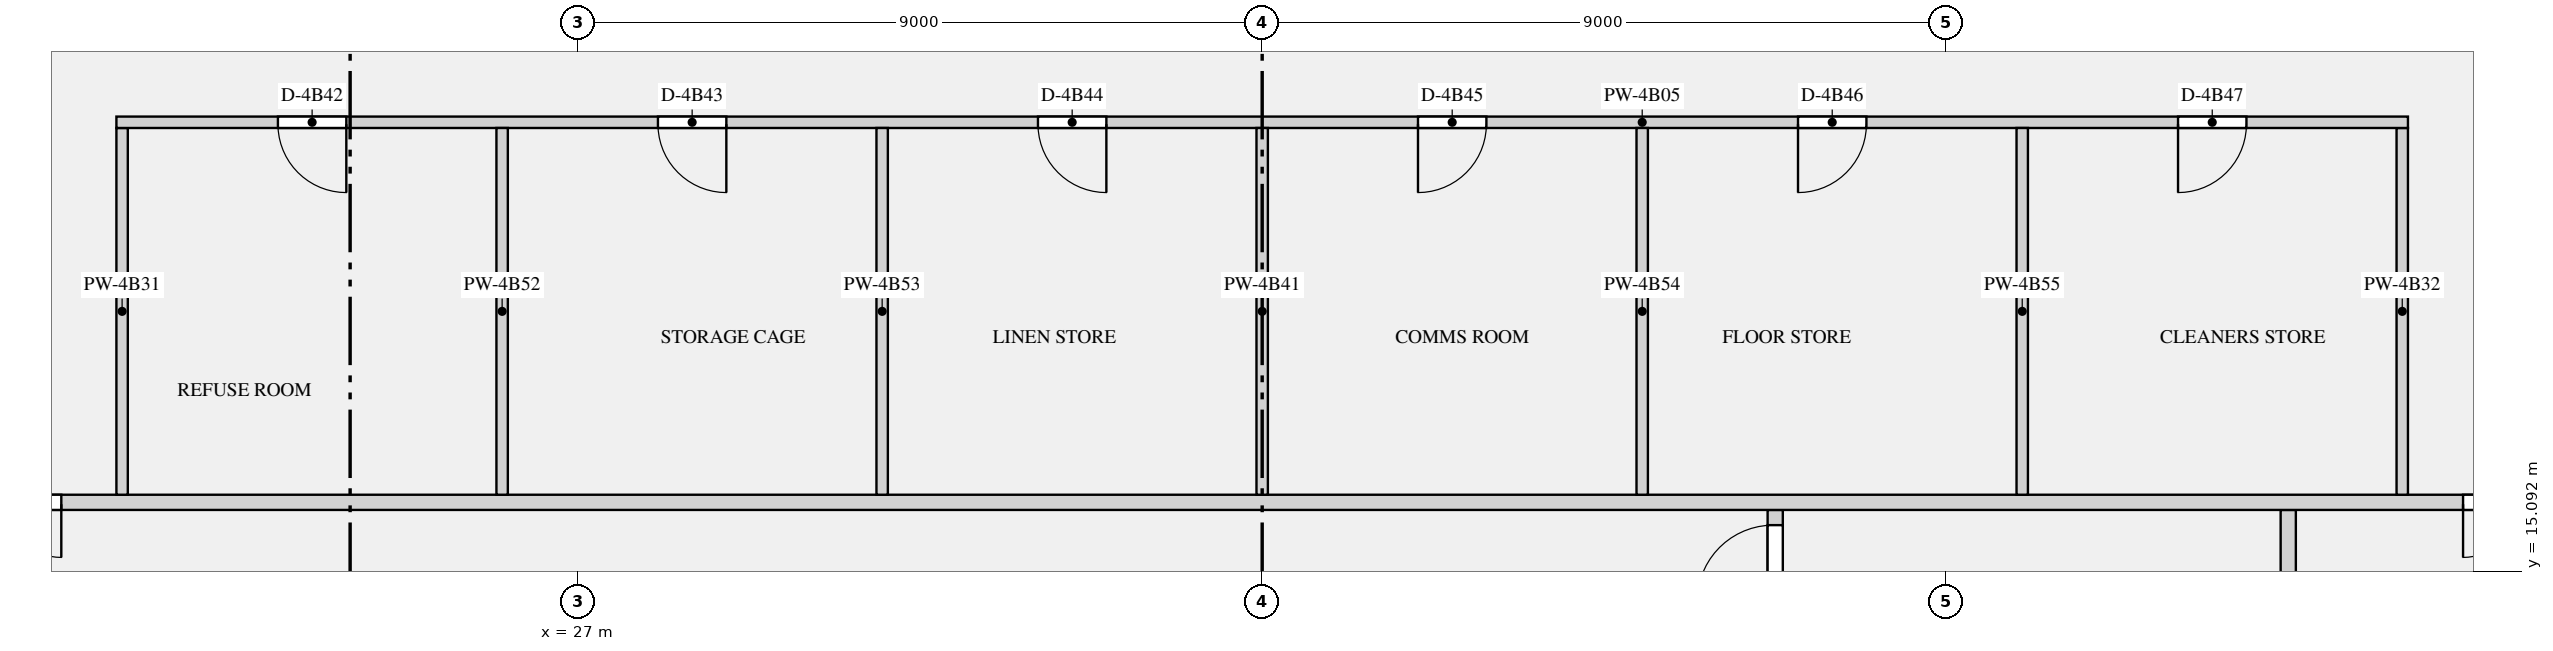
"""IFC4 building model, lengths in metres.
Left out: names, types, materials, properties, quantities, classifications, styles, units other than length and angle.
Written with IfcOpenShell. Run it as: python <this file> out.ifc"""

import sys

from ifc_helpers import new_model, si_unit, direction, frame, frame_2d, origin, place, context, subcontext, project, spatial, rectangle, extrude, element, fill, save


model = new_model("IFC4")
c1 = context("Model", 3, precision=1e-05, world=origin(), true_north=direction((0.0, 1.0)))
c2 = subcontext(c1, "Body", "Model", "MODEL_VIEW")
j1 = project(units=[si_unit("LENGTHUNIT", "METRE"), si_unit("PLANEANGLEUNIT", "RADIAN")], contexts=[c1])
p1 = place(None, origin())
s1 = spatial("IfcSite", under=j1, at=p1, CompositionType="ELEMENT")
p2 = place(p1, origin())
s2 = spatial("IfcBuilding", under=s1, at=p2, CompositionType="ELEMENT")
p3 = place(p2, frame((0.0, 0.0, 207.45)))
s3 = spatial("IfcBuildingStorey", under=s2, at=p3, CompositionType="ELEMENT", Elevation=207.45)
p4 = place(p3, frame((49.5, 12.5, 0.0), z_axis=(0.0, 0.0, 1.0), x_axis=(0.0, 1.0, 0.0)))
e1 = element("IfcWall", 1, at=p4, inside=s3, PredefinedType="PARTITIONING", context=c2, shape_type="SweptSolid", body=[
    extrude(rectangle(XDim=3.4, YDim=0.2, at=frame_2d((1.7, 0.0))), origin(), (0.0, 0.0, 1.0), 2.83),
])
p5 = place(p4, frame((1.15, 0.0, 0.0)))
e2 = element("IfcOpeningElement", 2, at=p5, cuts=e1, PredefinedType="OPENING", context=c2, shape_type="SweptSolid", body=[
    extrude(rectangle(XDim=1.1, YDim=2.1, at=frame_2d((0.55, 1.05))), frame((0.0, 0.11, 0.0), z_axis=(0.0, -1.0, 0.0), x_axis=(1.0, 0.0, 0.0)), (0.0, 0.0, 1.0), 0.22),
])
p6 = place(p3, frame((42.75, 14.575, 0.0), z_axis=(0.0, 0.0, 1.0), x_axis=(0.0, 1.0, 0.0)))
e3 = element("IfcWall", 3, at=p6, inside=s3, PredefinedType="PARTITIONING", context=c2, shape_type="SweptSolid", body=[
    extrude(rectangle(XDim=1.325, YDim=0.2, at=frame_2d((0.663, 0.0))), origin(), (0.0, 0.0, 1.0), 2.83),
])
p7 = place(p6, frame((0.125, 0.0, 0.0)))
e4 = element("IfcOpeningElement", 4, at=p7, cuts=e3, PredefinedType="OPENING", context=c2, shape_type="SweptSolid", body=[
    extrude(rectangle(XDim=1.0, YDim=2.1, at=frame_2d((0.5, 1.05))), frame((0.0, 0.11, 0.0), z_axis=(0.0, -1.0, 0.0), x_axis=(1.0, 0.0, 0.0)), (0.0, 0.0, 1.0), 0.22),
])
p8 = place(p3, frame((20.925, 21.0, 0.0), z_axis=(0.0, 0.0, 1.0), x_axis=(1.0, 0.0, 0.0)))
e5 = element("IfcWall", 5, at=p8, inside=s3, PredefinedType="PARTITIONING", context=c2, shape_type="SweptSolid", body=[
    extrude(rectangle(XDim=30.15, YDim=0.15, at=frame_2d((15.075, 0.0))), origin(), (0.0, 0.0, 1.0), 2.83),
])
p9 = place(p8, frame((2.125, 0.0, 0.0)))
e6 = element("IfcOpeningElement", 6, at=p9, cuts=e5, PredefinedType="OPENING", context=c2, shape_type="SweptSolid", body=[
    extrude(rectangle(XDim=0.9, YDim=2.1, at=frame_2d((0.45, 1.05))), frame((0.0, 0.085, 0.0), z_axis=(0.0, -1.0, 0.0), x_axis=(1.0, 0.0, 0.0)), (0.0, 0.0, 1.0), 0.17),
])
p10 = place(p8, frame((7.125, 0.0, 0.0)))
e7 = element("IfcOpeningElement", 7, at=p10, cuts=e5, PredefinedType="OPENING", context=c2, shape_type="SweptSolid", body=[
    extrude(rectangle(XDim=0.9, YDim=2.1, at=frame_2d((0.45, 1.05))), frame((0.0, 0.085, 0.0), z_axis=(0.0, -1.0, 0.0), x_axis=(1.0, 0.0, 0.0)), (0.0, 0.0, 1.0), 0.17),
])
p11 = place(p8, frame((12.125, 0.0, 0.0)))
e8 = element("IfcOpeningElement", 8, at=p11, cuts=e5, PredefinedType="OPENING", context=c2, shape_type="SweptSolid", body=[
    extrude(rectangle(XDim=0.9, YDim=2.1, at=frame_2d((0.45, 1.05))), frame((0.0, 0.085, 0.0), z_axis=(0.0, -1.0, 0.0), x_axis=(1.0, 0.0, 0.0)), (0.0, 0.0, 1.0), 0.17),
])
p12 = place(p8, frame((17.125, 0.0, 0.0)))
e9 = element("IfcOpeningElement", 9, at=p12, cuts=e5, PredefinedType="OPENING", context=c2, shape_type="SweptSolid", body=[
    extrude(rectangle(XDim=0.9, YDim=2.1, at=frame_2d((0.45, 1.05))), frame((0.0, 0.085, 0.0), z_axis=(0.0, -1.0, 0.0), x_axis=(1.0, 0.0, 0.0)), (0.0, 0.0, 1.0), 0.17),
])
p13 = place(p8, frame((22.125, 0.0, 0.0)))
e10 = element("IfcOpeningElement", 10, at=p13, cuts=e5, PredefinedType="OPENING", context=c2, shape_type="SweptSolid", body=[
    extrude(rectangle(XDim=0.9, YDim=2.1, at=frame_2d((0.45, 1.05))), frame((0.0, 0.085, 0.0), z_axis=(0.0, -1.0, 0.0), x_axis=(1.0, 0.0, 0.0)), (0.0, 0.0, 1.0), 0.17),
])
p14 = place(p8, frame((27.125, 0.0, 0.0)))
e11 = element("IfcOpeningElement", 11, at=p14, cuts=e5, PredefinedType="OPENING", context=c2, shape_type="SweptSolid", body=[
    extrude(rectangle(XDim=0.9, YDim=2.1, at=frame_2d((0.45, 1.05))), frame((0.0, 0.085, 0.0), z_axis=(0.0, -1.0, 0.0), x_axis=(1.0, 0.0, 0.0)), (0.0, 0.0, 1.0), 0.17),
])
p15 = place(p3, frame((17.9, 16.0, 0.0), z_axis=(0.0, 0.0, 1.0), x_axis=(1.0, 0.0, 0.0)))
e12 = element("IfcWall", 12, at=p15, inside=s3, PredefinedType="PARTITIONING", context=c2, shape_type="SweptSolid", body=[
    extrude(rectangle(XDim=36.2, YDim=0.2, at=frame_2d((18.1, 0.0))), origin(), (0.0, 0.0, 1.0), 2.83),
])
p16 = place(p15, frame((0.9, 0.0, 0.0)))
e13 = element("IfcOpeningElement", 13, at=p16, cuts=e12, PredefinedType="OPENING", context=c2, shape_type="SweptSolid", body=[
    extrude(rectangle(XDim=1.4, YDim=2.1, at=frame_2d((0.7, 1.05))), frame((0.0, 0.11, 0.0), z_axis=(0.0, -1.0, 0.0), x_axis=(1.0, 0.0, 0.0)), (0.0, 0.0, 1.0), 0.22),
])
p17 = place(p15, frame((33.9, 0.0, 0.0)))
e14 = element("IfcOpeningElement", 14, at=p17, cuts=e12, PredefinedType="OPENING", context=c2, shape_type="SweptSolid", body=[
    extrude(rectangle(XDim=1.4, YDim=2.1, at=frame_2d((0.7, 1.05))), frame((0.0, 0.11, 0.0), z_axis=(0.0, -1.0, 0.0), x_axis=(1.0, 0.0, 0.0)), (0.0, 0.0, 1.0), 0.22),
])
for number, where, z_axis, x_axis in (
    (15, (21.0, 16.1, 0.0), (0.0, 0.0, 1.0), (0.0, 1.0, 0.0)),
    (16, (51.0, 16.1, 0.0), (0.0, 0.0, 1.0), (0.0, 1.0, 0.0)),
    (17, (36.0, 16.1, 0.0), (0.0, 0.0, 1.0), (0.0, 1.0, 0.0)),
    (18, (26.0, 16.1, 0.0), (0.0, 0.0, 1.0), (0.0, 1.0, 0.0)),
    (19, (31.0, 16.1, 0.0), (0.0, 0.0, 1.0), (0.0, 1.0, 0.0)),
    (20, (41.0, 16.1, 0.0), (0.0, 0.0, 1.0), (0.0, 1.0, 0.0)),
    (21, (46.0, 16.1, 0.0), (0.0, 0.0, 1.0), (0.0, 1.0, 0.0)),
):
    element("IfcWall", number, at=place(p3, frame(where, z_axis=z_axis, x_axis=x_axis)), inside=s3, PredefinedType="PARTITIONING", context=c2, shape_type="SweptSolid", body=[
        extrude(rectangle(XDim=4.825, YDim=0.15, at=frame_2d((2.413, 0.0))), origin(), (0.0, 0.0, 1.0), 2.83),
    ])
p18 = place(p7, origin())
e22 = element("IfcDoor", 22, at=p18, inside=s3, OperationType="SINGLE_SWING_LEFT", PredefinedType="DOOR", context=c2, shape_type="SweptSolid", body=[
    extrude(rectangle(XDim=1.0, YDim=2.1, at=frame_2d((0.5, 1.05))), frame((0.0, 0.025, 0.0), z_axis=(0.0, -1.0, 0.0), x_axis=(1.0, 0.0, 0.0)), (0.0, 0.0, 1.0), 0.05),
])
fill(e4, e22)
p19 = place(p16, frame((1.4, 0.0, 0.0), z_axis=(0.0, 0.0, 1.0), x_axis=(-1.0, 0.0, 0.0)))
e23 = element("IfcDoor", 23, at=p19, inside=s3, OperationType="DOUBLE_DOOR_SINGLE_SWING", PredefinedType="DOOR", context=c2, shape_type="SweptSolid", body=[
    extrude(rectangle(XDim=1.4, YDim=2.1, at=frame_2d((0.7, 1.05))), frame((0.0, 0.025, 0.0), z_axis=(0.0, -1.0, 0.0), x_axis=(1.0, 0.0, 0.0)), (0.0, 0.0, 1.0), 0.05),
])
fill(e13, e23)
p20 = place(p17, frame((1.4, 0.0, 0.0), z_axis=(0.0, 0.0, 1.0), x_axis=(-1.0, 0.0, 0.0)))
e24 = element("IfcDoor", 24, at=p20, inside=s3, OperationType="DOUBLE_DOOR_SINGLE_SWING", PredefinedType="DOOR", context=c2, shape_type="SweptSolid", body=[
    extrude(rectangle(XDim=1.4, YDim=2.1, at=frame_2d((0.7, 1.05))), frame((0.0, 0.025, 0.0), z_axis=(0.0, -1.0, 0.0), x_axis=(1.0, 0.0, 0.0)), (0.0, 0.0, 1.0), 0.05),
])
fill(e14, e24)
p21 = place(p9, frame((0.9, 0.0, 0.0), z_axis=(0.0, 0.0, 1.0), x_axis=(-1.0, 0.0, 0.0)))
e25 = element("IfcDoor", 25, at=p21, inside=s3, OperationType="SINGLE_SWING_LEFT", PredefinedType="DOOR", context=c2, shape_type="SweptSolid", body=[
    extrude(rectangle(XDim=0.9, YDim=2.1, at=frame_2d((0.45, 1.05))), frame((0.0, 0.025, 0.0), z_axis=(0.0, -1.0, 0.0), x_axis=(1.0, 0.0, 0.0)), (0.0, 0.0, 1.0), 0.05),
])
fill(e6, e25)
p22 = place(p10, frame((0.9, 0.0, 0.0), z_axis=(0.0, 0.0, 1.0), x_axis=(-1.0, 0.0, 0.0)))
e26 = element("IfcDoor", 26, at=p22, inside=s3, OperationType="SINGLE_SWING_LEFT", PredefinedType="DOOR", context=c2, shape_type="SweptSolid", body=[
    extrude(rectangle(XDim=0.9, YDim=2.1, at=frame_2d((0.45, 1.05))), frame((0.0, 0.025, 0.0), z_axis=(0.0, -1.0, 0.0), x_axis=(1.0, 0.0, 0.0)), (0.0, 0.0, 1.0), 0.05),
])
fill(e7, e26)
p23 = place(p11, frame((0.9, 0.0, 0.0), z_axis=(0.0, 0.0, 1.0), x_axis=(-1.0, 0.0, 0.0)))
e27 = element("IfcDoor", 27, at=p23, inside=s3, OperationType="SINGLE_SWING_LEFT", PredefinedType="DOOR", context=c2, shape_type="SweptSolid", body=[
    extrude(rectangle(XDim=0.9, YDim=2.1, at=frame_2d((0.45, 1.05))), frame((0.0, 0.025, 0.0), z_axis=(0.0, -1.0, 0.0), x_axis=(1.0, 0.0, 0.0)), (0.0, 0.0, 1.0), 0.05),
])
fill(e8, e27)
p24 = place(p12, frame((0.9, 0.0, 0.0), z_axis=(0.0, 0.0, 1.0), x_axis=(-1.0, 0.0, 0.0)))
e28 = element("IfcDoor", 28, at=p24, inside=s3, OperationType="SINGLE_SWING_RIGHT", PredefinedType="DOOR", context=c2, shape_type="SweptSolid", body=[
    extrude(rectangle(XDim=0.9, YDim=2.1, at=frame_2d((0.45, 1.05))), frame((0.0, 0.025, 0.0), z_axis=(0.0, -1.0, 0.0), x_axis=(1.0, 0.0, 0.0)), (0.0, 0.0, 1.0), 0.05),
])
fill(e9, e28)
p25 = place(p13, frame((0.9, 0.0, 0.0), z_axis=(0.0, 0.0, 1.0), x_axis=(-1.0, 0.0, 0.0)))
e29 = element("IfcDoor", 29, at=p25, inside=s3, OperationType="SINGLE_SWING_RIGHT", PredefinedType="DOOR", context=c2, shape_type="SweptSolid", body=[
    extrude(rectangle(XDim=0.9, YDim=2.1, at=frame_2d((0.45, 1.05))), frame((0.0, 0.025, 0.0), z_axis=(0.0, -1.0, 0.0), x_axis=(1.0, 0.0, 0.0)), (0.0, 0.0, 1.0), 0.05),
])
fill(e10, e29)
p26 = place(p14, frame((0.9, 0.0, 0.0), z_axis=(0.0, 0.0, 1.0), x_axis=(-1.0, 0.0, 0.0)))
e30 = element("IfcDoor", 30, at=p26, inside=s3, OperationType="SINGLE_SWING_RIGHT", PredefinedType="DOOR", context=c2, shape_type="SweptSolid", body=[
    extrude(rectangle(XDim=0.9, YDim=2.1, at=frame_2d((0.45, 1.05))), frame((0.0, 0.025, 0.0), z_axis=(0.0, -1.0, 0.0), x_axis=(1.0, 0.0, 0.0)), (0.0, 0.0, 1.0), 0.05),
])
fill(e11, e30)
save(model, sys.argv[1])
